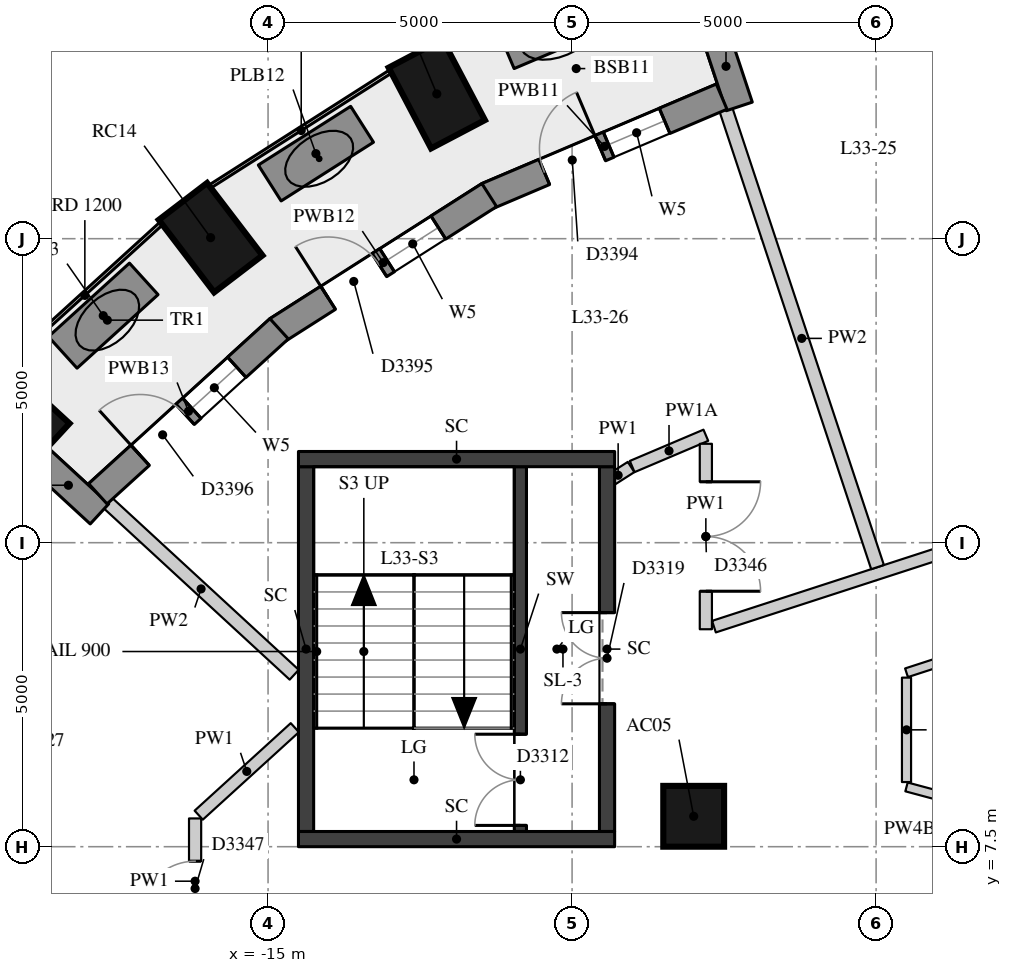
"""IFC4 building model, lengths in metres.
Left out: names, types, materials, properties, quantities, classifications, styles, units other than length and angle.
Written with IfcOpenShell. Run it as: python <this file> out.ifc"""

import sys

from ifc_helpers import new_model, si_unit, direction, frame, frame_2d, origin, origin_2d, place, context, subcontext, project, spatial, rectangle, extrude, element, fill, save


model = new_model("IFC4")
c1 = context("Model", 3, precision=1e-05, world=origin(), true_north=direction((0.0, 1.0)))
c2 = subcontext(c1, "Body", "Model", "MODEL_VIEW")
j1 = project(units=[si_unit("LENGTHUNIT", "METRE"), si_unit("PLANEANGLEUNIT", "RADIAN")], contexts=[c1])
p1 = place(None, origin())
s1 = spatial("IfcSite", under=j1, at=p1, CompositionType="ELEMENT")
p2 = place(p1, origin())
s2 = spatial("IfcBuilding", under=s1, at=p2, CompositionType="ELEMENT")
p3 = place(p2, frame((0.0, 0.0, 118.6)))
s3 = spatial("IfcBuildingStorey", under=s2, at=p3, CompositionType="ELEMENT", Elevation=118.6)
for number, where, z_axis, x_axis in (
    (1, (-12.225, 19.882, 0.0), (0.0, 0.0, 1.0), (-0.465, 0.885, 0.0)),
    (2, (-15.945, 17.517, 0.0), (0.0, 0.0, 1.0), (-0.607, 0.795, 0.0)),
    (3, (-19.156, 14.602, 0.0), (0.0, 0.0, 1.0), (-0.735, 0.678, 0.0)),
):
    element("IfcColumn", number, at=place(p3, frame(where, z_axis=z_axis, x_axis=x_axis)), inside=s3, PredefinedType="COLUMN", context=c2, shape_type="SweptSolid", body=[
        extrude(rectangle(XDim=1.5, YDim=1.0, at=origin_2d()), origin(), (0.0, 0.0, 1.0), 3.3),
    ])
p4 = place(p3, frame((-8.0, 8.0, 0.0), z_axis=(0.0, 0.0, 1.0), x_axis=(1.0, 0.0, 0.0)))
e4 = element("IfcColumn", 4, at=p4, inside=s3, PredefinedType="COLUMN", context=c2, shape_type="SweptSolid", body=[
    extrude(rectangle(XDim=1.0, YDim=1.0, at=origin_2d()), origin(), (0.0, 0.0, 1.0), 3.3),
])
p5 = place(p3, frame((-7.687, 20.995, 0.0), z_axis=(0.0, 0.0, 1.0), x_axis=(0.314541283205, -0.949243794375, 0.0)))
e5 = element("IfcWall", 5, at=p5, inside=s3, PredefinedType="SOLIDWALL", context=c2, shape_type="SweptSolid", body=[
    extrude(rectangle(XDim=1.39, YDim=0.45, at=frame_2d((0.695, 0.0))), origin(), (0.0, 0.0, 1.0), 3.02),
])
p6 = place(p3, frame((-18.795, 13.916, 0.0), z_axis=(0.0, 0.0, 1.0), x_axis=(0.735395448697, -0.677638202905, 0.0)))
e6 = element("IfcWall", 6, at=p6, inside=s3, PredefinedType="SOLIDWALL", context=c2, shape_type="SweptSolid", body=[
    extrude(rectangle(XDim=1.391, YDim=0.45, at=frame_2d((0.695, 0.0))), origin(), (0.0, 0.0, 1.0), 3.02),
])
p7 = place(p3, frame((-7.54, 19.836, 0.0), z_axis=(0.0, 0.0, 1.0), x_axis=(-0.920502375708, -0.390736965637, 0.0)))
e7 = element("IfcWall", 7, at=p7, inside=s3, PredefinedType="SOLIDWALL", context=c2, shape_type="SweptSolid", body=[
    extrude(rectangle(XDim=4.188, YDim=0.45, at=frame_2d((2.094, 0.0))), origin(), (0.0, 0.0, 1.0), 3.02),
])
p8 = place(p7, frame((1.019, 0.0, 0.4)))
e8 = element("IfcOpeningElement", 8, at=p8, cuts=e7, PredefinedType="OPENING", context=c2, shape_type="SweptSolid", body=[
    extrude(rectangle(XDim=1.0, YDim=1.75, at=frame_2d((0.5, 0.875))), frame((0.0, 0.235, 0.0), z_axis=(0.0, -1.0, 0.0), x_axis=(1.0, 0.0, 0.0)), (0.0, 0.0, 1.0), 0.47),
])
p9 = place(p7, frame((2.169, 0.0, 0.0)))
e9 = element("IfcOpeningElement", 9, at=p9, cuts=e7, PredefinedType="OPENING", context=c2, shape_type="SweptSolid", body=[
    extrude(rectangle(XDim=1.0, YDim=2.15, at=frame_2d((0.5, 1.075))), frame((0.0, 0.235, 0.0), z_axis=(0.0, -1.0, 0.0), x_axis=(1.0, 0.0, 0.0)), (0.0, 0.0, 1.0), 0.47),
])
p10 = place(p3, frame((-11.362, 18.217, 0.0), z_axis=(0.0, 0.0, 1.0), x_axis=(-0.843284405788, -0.537467590609, 0.0)))
e10 = element("IfcWall", 10, at=p10, inside=s3, PredefinedType="SOLIDWALL", context=c2, shape_type="SweptSolid", body=[
    extrude(rectangle(XDim=4.135, YDim=0.45, at=frame_2d((2.067, 0.0))), origin(), (0.0, 0.0, 1.0), 3.02),
])
p11 = place(p10, frame((0.992, 0.0, 0.4)))
e11 = element("IfcOpeningElement", 11, at=p11, cuts=e10, PredefinedType="OPENING", context=c2, shape_type="SweptSolid", body=[
    extrude(rectangle(XDim=1.0, YDim=1.75, at=frame_2d((0.5, 0.875))), frame((0.0, 0.235, 0.0), z_axis=(0.0, -1.0, 0.0), x_axis=(1.0, 0.0, 0.0)), (0.0, 0.0, 1.0), 0.47),
])
p12 = place(p10, frame((2.142, 0.0, 0.0)))
e12 = element("IfcOpeningElement", 12, at=p12, cuts=e10, PredefinedType="OPENING", context=c2, shape_type="SweptSolid", body=[
    extrude(rectangle(XDim=1.0, YDim=2.15, at=frame_2d((0.5, 1.075))), frame((0.0, 0.235, 0.0), z_axis=(0.0, -1.0, 0.0), x_axis=(1.0, 0.0, 0.0)), (0.0, 0.0, 1.0), 0.47),
])
p13 = place(p3, frame((-14.818, 16.018, 0.0), z_axis=(0.0, 0.0, 1.0), x_axis=(-0.739460283824, -0.673200184675, 0.0)))
e13 = element("IfcWall", 13, at=p13, inside=s3, PredefinedType="SOLIDWALL", context=c2, shape_type="SweptSolid", body=[
    extrude(rectangle(XDim=4.031, YDim=0.45, at=frame_2d((2.016, 0.0))), origin(), (0.0, 0.0, 1.0), 3.02),
])
p14 = place(p13, frame((0.94, 0.0, 0.4)))
e14 = element("IfcOpeningElement", 14, at=p14, cuts=e13, PredefinedType="OPENING", context=c2, shape_type="SweptSolid", body=[
    extrude(rectangle(XDim=1.0, YDim=1.75, at=frame_2d((0.5, 0.875))), frame((0.0, 0.235, 0.0), z_axis=(0.0, -1.0, 0.0), x_axis=(1.0, 0.0, 0.0)), (0.0, 0.0, 1.0), 0.47),
])
p15 = place(p13, frame((2.091, 0.0, 0.0)))
e15 = element("IfcOpeningElement", 15, at=p15, cuts=e13, PredefinedType="OPENING", context=c2, shape_type="SweptSolid", body=[
    extrude(rectangle(XDim=1.0, YDim=2.15, at=frame_2d((0.5, 1.075))), frame((0.0, 0.235, 0.0), z_axis=(0.0, -1.0, 0.0), x_axis=(1.0, 0.0, 0.0)), (0.0, 0.0, 1.0), 0.47),
])
for number, where, z_axis, x_axis in (
    (16, (-9.432, 21.322, 0.0), (0.0, 0.0, 1.0), (-0.921, -0.39, 0.0)),
    (17, (-13.454, 19.382, 0.0), (0.0, 0.0, 1.0), (-0.844, -0.537, 0.0)),
):
    element("IfcWall", number, at=place(p3, frame(where, z_axis=z_axis, x_axis=x_axis)), inside=s3, PredefinedType="USERDEFINED", context=c2, shape_type="SweptSolid", body=[
        extrude(rectangle(XDim=1.8, YDim=0.7, at=frame_2d((0.9, 0.0))), origin(), (0.0, 0.0, 1.0), 0.75),
    ])
p16 = place(p3, frame((-17.044, 16.839, 0.0), z_axis=(0.0, 0.0, 1.0), x_axis=(-0.740332755969, -0.6722405897, 0.0)))
e18 = element("IfcWall", 18, at=p16, inside=s3, PredefinedType="USERDEFINED", context=c2, shape_type="SweptSolid", body=[
    extrude(rectangle(XDim=1.8, YDim=0.7, at=frame_2d((0.9, 0.0))), origin(), (0.0, 0.0, 1.0), 0.75),
])
p17 = place(p3, frame((-10.85, 7.75, 0.0), z_axis=(0.0, 0.0, 1.0), x_axis=(0.0, 1.0, 0.0)))
e19 = element("IfcWall", 19, at=p17, inside=s3, PredefinedType="SHEAR", context=c2, shape_type="SweptSolid", body=[
    extrude(rectangle(XDim=6.0, YDim=0.2, at=frame_2d((3.0, 0.0))), origin(), (0.0, 0.0, 1.0), 3.02),
])
p18 = place(p17, frame((0.1, 0.0, 0.0)))
e20 = element("IfcOpeningElement", 20, at=p18, cuts=e19, PredefinedType="OPENING", context=c2, shape_type="SweptSolid", body=[
    extrude(rectangle(XDim=1.5, YDim=2.1, at=frame_2d((0.75, 1.05))), frame((0.0, 0.11, 0.0), z_axis=(0.0, -1.0, 0.0), x_axis=(1.0, 0.0, 0.0)), (0.0, 0.0, 1.0), 0.22),
])
p19 = place(p3, frame((-14.375, 7.75, -0.28), z_axis=(0.0, 0.0, 1.0), x_axis=(0.0, 1.0, 0.0)))
e21 = element("IfcWall", 21, at=p19, inside=s3, PredefinedType="SHEAR", context=c2, shape_type="SweptSolid", body=[
    extrude(rectangle(XDim=6.0, YDim=0.25, at=frame_2d((3.0, 0.0))), origin(), (0.0, 0.0, 1.0), 3.3),
])
p20 = place(p3, frame((-9.425, 7.75, -0.28), z_axis=(0.0, 0.0, 1.0), x_axis=(0.0, 1.0, 0.0)))
e22 = element("IfcWall", 22, at=p20, inside=s3, PredefinedType="SHEAR", context=c2, shape_type="SweptSolid", body=[
    extrude(rectangle(XDim=6.0, YDim=0.25, at=frame_2d((3.0, 0.0))), origin(), (0.0, 0.0, 1.0), 3.3),
])
p21 = place(p20, frame((2.1, 0.0, 0.28)))
e23 = element("IfcOpeningElement", 23, at=p21, cuts=e22, PredefinedType="OPENING", context=c2, shape_type="SweptSolid", body=[
    extrude(rectangle(XDim=1.5, YDim=2.1, at=frame_2d((0.75, 1.05))), frame((0.0, 0.135, 0.0), z_axis=(0.0, -1.0, 0.0), x_axis=(1.0, 0.0, 0.0)), (0.0, 0.0, 1.0), 0.27),
])
for number, where, z_axis, x_axis in (
    (24, (-14.5, 13.875, -0.28), (0.0, 0.0, 1.0), (1.0, 0.0, 0.0)),
    (25, (-14.5, 7.625, -0.28), (0.0, 0.0, 1.0), (1.0, 0.0, 0.0)),
):
    element("IfcWall", number, at=place(p3, frame(where, z_axis=z_axis, x_axis=x_axis)), inside=s3, PredefinedType="SHEAR", context=c2, shape_type="SweptSolid", body=[
        extrude(rectangle(XDim=5.2, YDim=0.25, at=frame_2d((2.6, 0.0))), origin(), (0.0, 0.0, 1.0), 3.3),
    ])
p22 = place(p3, frame((-16.2, 5.9, 0.0), z_axis=(0.0, 0.0, 1.0), x_axis=(0.0, 1.0, 0.0)))
e26 = element("IfcWall", 26, at=p22, inside=s3, PredefinedType="PARTITIONING", context=c2, shape_type="SweptSolid", body=[
    extrude(rectangle(XDim=2.065, YDim=0.2, at=frame_2d((1.032, 0.0))), origin(), (0.0, 0.0, 1.0), 3.02),
])
p23 = place(p22, frame((0.462, 0.0, 0.0)))
e27 = element("IfcOpeningElement", 27, at=p23, cuts=e26, PredefinedType="OPENING", context=c2, shape_type="SweptSolid", body=[
    extrude(rectangle(XDim=0.9, YDim=2.1, at=frame_2d((0.45, 1.05))), frame((0.0, 0.11, 0.0), z_axis=(0.0, -1.0, 0.0), x_axis=(1.0, 0.0, 0.0)), (0.0, 0.0, 1.0), 0.22),
])
p24 = place(p3, frame((-16.14, 8.019, 0.0), z_axis=(0.0, 0.0, 1.0), x_axis=(0.739392120684, 0.673275049197, 0.0)))
e28 = element("IfcWall", 28, at=p24, inside=s3, PredefinedType="PARTITIONING", context=c2, shape_type="SweptSolid", body=[
    extrude(rectangle(XDim=2.138, YDim=0.2, at=frame_2d((1.069, 0.0))), origin(), (0.0, 0.0, 1.0), 3.02),
])
p25 = place(p3, frame((-9.455, 13.474, 0.0), z_axis=(0.0, 0.0, 1.0), x_axis=(0.843342387181, 0.537376607216, 0.0)))
e29 = element("IfcWall", 29, at=p25, inside=s3, PredefinedType="PARTITIONING", context=c2, shape_type="SweptSolid", body=[
    extrude(rectangle(XDim=0.504, YDim=0.2, at=frame_2d((0.252, 0.0))), origin(), (0.0, 0.0, 1.0), 3.02),
])
p26 = place(p3, frame((-9.011, 13.752, 0.0), z_axis=(0.0, 0.0, 1.0), x_axis=(0.920454408747, 0.390849947446, 0.0)))
e30 = element("IfcWall", 30, at=p26, inside=s3, PredefinedType="PARTITIONING", context=c2, shape_type="SweptSolid", body=[
    extrude(rectangle(XDim=1.316, YDim=0.2, at=frame_2d((0.658, 0.0))), origin(), (0.0, 0.0, 1.0), 2.57),
])
p27 = place(p3, frame((-7.8, 14.127, 0.0), z_axis=(0.0, 0.0, 1.0), x_axis=(0.0, -1.0, 0.0)))
e31 = element("IfcWall", 31, at=p27, inside=s3, PredefinedType="PARTITIONING", context=c2, shape_type="SweptSolid", body=[
    extrude(rectangle(XDim=3.05, YDim=0.2, at=frame_2d((1.525, 0.0))), origin(), (0.0, 0.0, 1.0), 3.02),
])
p28 = place(p27, frame((0.625, 0.0, 0.0)))
e32 = element("IfcOpeningElement", 32, at=p28, cuts=e31, PredefinedType="OPENING", context=c2, shape_type="SweptSolid", body=[
    extrude(rectangle(XDim=1.8, YDim=2.1, at=frame_2d((0.9, 1.05))), frame((0.0, 0.11, 0.0), z_axis=(0.0, -1.0, 0.0), x_axis=(1.0, 0.0, 0.0)), (0.0, 0.0, 1.0), 0.22),
])
p29 = place(p3, frame((-7.667, 11.119, 0.0), z_axis=(0.0, 0.0, 1.0), x_axis=(0.951088334028, 0.308919052304, 0.0)))
e33 = element("IfcWall", 33, at=p29, inside=s3, PredefinedType="PARTITIONING", context=c2, shape_type="SweptSolid", body=[
    extrude(rectangle(XDim=12.362, YDim=0.2, at=frame_2d((6.181, 0.0))), origin(), (0.0, 0.0, 1.0), 3.02),
])
p30 = place(p29, frame((7.686, 0.0, 0.0)))
e34 = element("IfcOpeningElement", 34, at=p30, cuts=e33, PredefinedType="OPENING", context=c2, shape_type="SweptSolid", body=[
    extrude(rectangle(XDim=1.1, YDim=2.1, at=frame_2d((0.55, 1.05))), frame((0.0, 0.11, 0.0), z_axis=(0.0, -1.0, 0.0), x_axis=(1.0, 0.0, 0.0)), (0.0, 0.0, 1.0), 0.22),
])
p31 = place(p29, frame((3.88, 0.0, 0.0)))
e35 = element("IfcOpeningElement", 35, at=p31, cuts=e33, PredefinedType="OPENING", context=c2, shape_type="SweptSolid", body=[
    extrude(rectangle(XDim=0.9, YDim=2.1, at=frame_2d((0.45, 1.05))), frame((0.0, 0.11, 0.0), z_axis=(0.0, -1.0, 0.0), x_axis=(1.0, 0.0, 0.0)), (0.0, 0.0, 1.0), 0.22),
])
p32 = place(p3, frame((-4.5, 10.361, 0.0), z_axis=(0.0, 0.0, 1.0), x_axis=(0.951090931116, 0.308911056372, 0.0)))
e36 = element("IfcWall", 36, at=p32, inside=s3, PredefinedType="PARTITIONING", context=c2, shape_type="SweptSolid", body=[
    extrude(rectangle(XDim=5.362, YDim=0.15, at=frame_2d((2.681, 0.0))), origin(), (0.0, 0.0, 1.0), 3.02),
])
p33 = place(p32, frame((2.231, 0.0, 0.0)))
e37 = element("IfcOpeningElement", 37, at=p33, cuts=e36, PredefinedType="OPENING", context=c2, shape_type="SweptSolid", body=[
    extrude(rectangle(XDim=0.9, YDim=2.1, at=frame_2d((0.45, 1.05))), frame((0.0, 0.085, 0.0), z_axis=(0.0, -1.0, 0.0), x_axis=(1.0, 0.0, 0.0)), (0.0, 0.0, 1.0), 0.17),
])
p34 = place(p3, frame((-3.328, 8.169, 0.0), z_axis=(0.0, 0.0, 1.0), x_axis=(-0.965933680277, 0.258789731841, 0.0)))
e38 = element("IfcWall", 38, at=p34, inside=s3, PredefinedType="PARTITIONING", context=c2, shape_type="SweptSolid", body=[
    extrude(rectangle(XDim=1.213, YDim=0.15, at=frame_2d((0.606, 0.0))), origin(), (0.0, 0.0, 1.0), 2.47),
])
p35 = place(p3, frame((-4.5, 8.563, 0.0), z_axis=(0.0, 0.0, 1.0), x_axis=(0.0, 1.0, 0.0)))
e39 = element("IfcWall", 39, at=p35, inside=s3, PredefinedType="PARTITIONING", context=c2, shape_type="SweptSolid", body=[
    extrude(rectangle(XDim=1.717, YDim=0.15, at=frame_2d((0.859, 0.0))), origin(), (0.0, 0.0, 1.0), 3.02),
])
p36 = place(p3, frame((-7.469, 19.622, 0.0), z_axis=(0.0, 0.0, 1.0), x_axis=(0.314545340174, -0.949242450049, 0.0)))
e40 = element("IfcWall", 40, at=p36, inside=s3, PredefinedType="PARTITIONING", context=c2, shape_type="SweptSolid", body=[
    extrude(rectangle(XDim=7.926, YDim=0.22, at=frame_2d((3.963, 0.0))), origin(), (0.0, 0.0, 1.0), 3.02),
])
p37 = place(p3, frame((-17.633, 13.151, 0.0), z_axis=(0.0, 0.0, 1.0), x_axis=(0.73535370522, -0.677683501511, 0.0)))
e41 = element("IfcWall", 41, at=p37, inside=s3, PredefinedType="PARTITIONING", context=c2, shape_type="SweptSolid", body=[
    extrude(rectangle(XDim=4.166, YDim=0.22, at=frame_2d((2.083, 0.0))), origin(), (0.0, 0.0, 1.0), 3.02),
])
p38 = place(p3, frame((-22.983, 7.21, 0.0), z_axis=(0.0, 0.0, 1.0), x_axis=(0.928548801607, -0.371210348771, 0.0)))
e42 = element("IfcWall", 42, at=p38, inside=s3, PredefinedType="PARTITIONING", context=c2, shape_type="SweptSolid", body=[
    extrude(rectangle(XDim=7.003, YDim=0.22, at=frame_2d((3.501, 0.0))), origin(), (0.0, 0.0, 1.0), 3.02),
])
p39 = place(p8, origin())
e43 = element("IfcWindow", 43, at=p39, inside=s3, PartitioningType="SINGLE_PANEL", PredefinedType="WINDOW", context=c2, shape_type="SweptSolid", body=[
    extrude(rectangle(XDim=1.0, YDim=1.75, at=frame_2d((0.5, 0.875))), frame((0.0, 0.035, 0.0), z_axis=(0.0, -1.0, 0.0), x_axis=(1.0, 0.0, 0.0)), (0.0, 0.0, 1.0), 0.06),
])
fill(e8, e43)
p40 = place(p9, frame((1.0, 0.0, 0.0), z_axis=(0.0, 0.0, 1.0), x_axis=(-1.0, 0.0, 0.0)))
e44 = element("IfcDoor", 44, at=p40, inside=s3, OperationType="SINGLE_SWING_RIGHT", PredefinedType="DOOR", context=c2, shape_type="SweptSolid", body=[
    extrude(rectangle(XDim=1.0, YDim=2.15, at=frame_2d((0.5, 1.075))), frame((0.0, 0.075, 0.0), z_axis=(0.0, -1.0, 0.0), x_axis=(1.0, 0.0, 0.0)), (0.0, 0.0, 1.0), 0.05),
])
fill(e9, e44)
p41 = place(p11, origin())
e45 = element("IfcWindow", 45, at=p41, inside=s3, PartitioningType="SINGLE_PANEL", PredefinedType="WINDOW", context=c2, shape_type="SweptSolid", body=[
    extrude(rectangle(XDim=1.0, YDim=1.75, at=frame_2d((0.5, 0.875))), frame((0.0, 0.035, 0.0), z_axis=(0.0, -1.0, 0.0), x_axis=(1.0, 0.0, 0.0)), (0.0, 0.0, 1.0), 0.06),
])
fill(e11, e45)
p42 = place(p12, frame((1.0, 0.0, 0.0), z_axis=(0.0, 0.0, 1.0), x_axis=(-1.0, 0.0, 0.0)))
e46 = element("IfcDoor", 46, at=p42, inside=s3, OperationType="SINGLE_SWING_LEFT", PredefinedType="DOOR", context=c2, shape_type="SweptSolid", body=[
    extrude(rectangle(XDim=1.0, YDim=2.15, at=frame_2d((0.5, 1.075))), frame((0.0, 0.075, 0.0), z_axis=(0.0, -1.0, 0.0), x_axis=(1.0, 0.0, 0.0)), (0.0, 0.0, 1.0), 0.05),
])
fill(e12, e46)
p43 = place(p14, origin())
e47 = element("IfcWindow", 47, at=p43, inside=s3, PartitioningType="SINGLE_PANEL", PredefinedType="WINDOW", context=c2, shape_type="SweptSolid", body=[
    extrude(rectangle(XDim=1.0, YDim=1.75, at=frame_2d((0.5, 0.875))), frame((0.0, 0.035, 0.0), z_axis=(0.0, -1.0, 0.0), x_axis=(1.0, 0.0, 0.0)), (0.0, 0.0, 1.0), 0.06),
])
fill(e14, e47)
p44 = place(p15, frame((1.0, 0.0, 0.0), z_axis=(0.0, 0.0, 1.0), x_axis=(-1.0, 0.0, 0.0)))
e48 = element("IfcDoor", 48, at=p44, inside=s3, OperationType="SINGLE_SWING_LEFT", PredefinedType="DOOR", context=c2, shape_type="SweptSolid", body=[
    extrude(rectangle(XDim=1.0, YDim=2.15, at=frame_2d((0.5, 1.075))), frame((0.0, 0.075, 0.0), z_axis=(0.0, -1.0, 0.0), x_axis=(1.0, 0.0, 0.0)), (0.0, 0.0, 1.0), 0.05),
])
fill(e15, e48)
p45 = place(p18, origin())
e49 = element("IfcDoor", 49, at=p45, inside=s3, OperationType="DOUBLE_DOOR_SINGLE_SWING", PredefinedType="DOOR", context=c2, shape_type="SweptSolid", body=[
    extrude(rectangle(XDim=1.5, YDim=2.1, at=frame_2d((0.75, 1.05))), frame((0.0, 0.025, 0.0), z_axis=(0.0, -1.0, 0.0), x_axis=(1.0, 0.0, 0.0)), (0.0, 0.0, 1.0), 0.05),
])
fill(e20, e49)
p46 = place(p21, origin())
e50 = element("IfcDoor", 50, at=p46, inside=s3, OperationType="DOUBLE_DOOR_SINGLE_SWING", PredefinedType="DOOR", context=c2, shape_type="SweptSolid", body=[
    extrude(rectangle(XDim=1.5, YDim=2.1, at=frame_2d((0.75, 1.05))), frame((0.0, 0.025, 0.0), z_axis=(0.0, -1.0, 0.0), x_axis=(1.0, 0.0, 0.0)), (0.0, 0.0, 1.0), 0.05),
])
fill(e23, e50)
p47 = place(p28, origin())
e51 = element("IfcDoor", 51, at=p47, inside=s3, OperationType="DOUBLE_DOOR_SINGLE_SWING", PredefinedType="DOOR", context=c2, shape_type="SweptSolid", body=[
    extrude(rectangle(XDim=1.8, YDim=2.1, at=frame_2d((0.9, 1.05))), frame((0.0, 0.025, 0.0), z_axis=(0.0, -1.0, 0.0), x_axis=(1.0, 0.0, 0.0)), (0.0, 0.0, 1.0), 0.05),
])
fill(e32, e51)
p48 = place(p23, origin())
e52 = element("IfcDoor", 52, at=p48, inside=s3, OperationType="SINGLE_SWING_LEFT", PredefinedType="DOOR", context=c2, shape_type="SweptSolid", body=[
    extrude(rectangle(XDim=0.9, YDim=2.1, at=frame_2d((0.45, 1.05))), frame((0.0, 0.025, 0.0), z_axis=(0.0, -1.0, 0.0), x_axis=(1.0, 0.0, 0.0)), (0.0, 0.0, 1.0), 0.05),
])
fill(e27, e52)
save(model, sys.argv[1])
